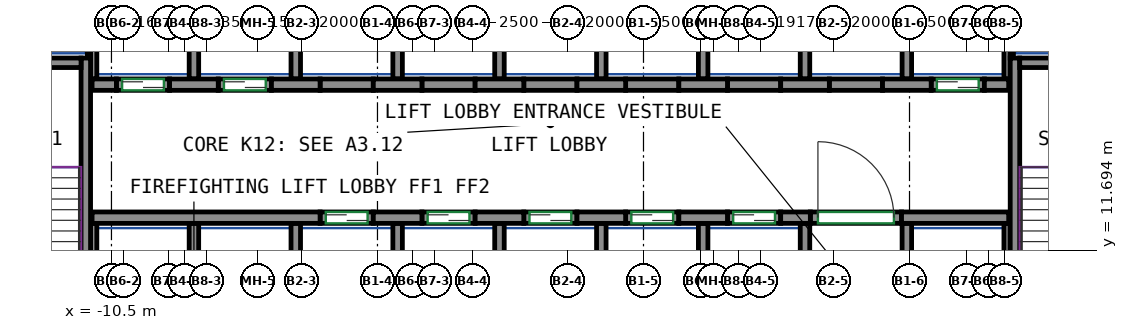
"""IFC4 building model, lengths in metres.
Left out: names, types, materials, properties, quantities, classifications, styles, units other than length and angle.
Written with IfcOpenShell. Run it as: python <this file> out.ifc"""

import sys

from ifc_helpers import new_model, si_unit, direction, frame, frame_2d, origin, place, context, subcontext, project, spatial, rectangle, extrude, source, transform, mapped, element, fill, save


model = new_model("IFC4")
c1 = context("Model", 3, precision=1e-05, world=origin(), true_north=direction((0.0, 1.0)))
c2 = subcontext(c1, "Body", "Model", "MODEL_VIEW")
j1 = project(units=[si_unit("LENGTHUNIT", "METRE"), si_unit("PLANEANGLEUNIT", "RADIAN")], contexts=[c1])
p1 = place(None, origin())
s1 = spatial("IfcSite", under=j1, at=p1, CompositionType="ELEMENT")
p2 = place(p1, origin())
s2 = spatial("IfcBuilding", under=s1, at=p2, CompositionType="ELEMENT")
p3 = place(p2, frame((0.0, 0.0, 51.0)))
s3 = spatial("IfcBuildingStorey", under=s2, at=p3, CompositionType="ELEMENT", Elevation=51.0)
m1 = source(origin(), c2, "Body", "SweptSolid", [
    extrude(rectangle(XDim=7.75, YDim=0.25, at=frame_2d((3.875, 0.0))), origin(), (0.0, 0.0, 1.0), 3.72),
])
p4 = place(p3, frame((-11.175, 9.0, 0.0), z_axis=(0.0, 0.0, 1.0), x_axis=(0.0, 1.0, 0.0)))
e1 = element("IfcWall", 1, at=p4, inside=s3, PredefinedType="SHEAR", context=c2, shape_type="MappedRepresentation", body=[
    mapped(m1, transform((0.0, 0.0, 0.0))),
])
m2 = source(origin(), c2, "Body", "SweptSolid", [
    extrude(rectangle(XDim=3.7, YDim=0.25, at=frame_2d((1.85, 0.0))), origin(), (0.0, 0.0, 1.0), 3.72),
])
p5 = place(p3, frame((-15.0, 16.625, 0.0), z_axis=(0.0, 0.0, 1.0), x_axis=(1.0, 0.0, 0.0)))
e2 = element("IfcWall", 2, at=p5, inside=s3, PredefinedType="SHEAR", context=c2, shape_type="MappedRepresentation", body=[
    mapped(m2, transform((0.0, 0.0, 0.0))),
])
p6 = place(p3, frame((13.275, 9.0, 0.0), z_axis=(0.0, 0.0, 1.0), x_axis=(0.0, 1.0, 0.0)))
e3 = element("IfcWall", 3, at=p6, inside=s3, PredefinedType="SHEAR", context=c2, shape_type="MappedRepresentation", body=[
    mapped(m1, transform((0.0, 0.0, 0.0))),
])
m3 = source(origin(), c2, "Body", "SweptSolid", [
    extrude(rectangle(XDim=3.7, YDim=0.25, at=frame_2d((1.85, 0.0))), origin(), (0.0, 0.0, 1.0), 3.72),
])
p7 = place(p3, frame((13.4, 16.625, 0.0), z_axis=(0.0, 0.0, 1.0), x_axis=(1.0, 0.0, 0.0)))
e4 = element("IfcWall", 4, at=p7, inside=s3, PredefinedType="SHEAR", context=c2, shape_type="MappedRepresentation", body=[
    mapped(m3, transform((0.0, 0.0, 0.0))),
])
m4 = source(origin(), c2, "Body", "SweptSolid", [
    extrude(rectangle(XDim=6.0, YDim=0.3, at=frame_2d((3.0, 0.0))), origin(), (0.0, 0.0, 1.0), 3.72),
])
p8 = place(p3, frame((-11.01, 12.55, 0.0), z_axis=(0.0, 0.0, 1.0), x_axis=(1.0, 0.0, 0.0)))
e5 = element("IfcWall", 5, at=p8, inside=s3, PredefinedType="SHEAR", context=c2, shape_type="MappedRepresentation", body=[
    mapped(m4, transform((0.0, 0.0, 0.0))),
])
m5 = source(origin(), c2, "Body", "SweptSolid", [
    extrude(rectangle(XDim=1.28, YDim=0.3, at=frame_2d((0.64, 0.0))), origin(), (0.0, 0.0, 1.0), 3.72),
])
for number, where, z_axis, x_axis in (
    (6, (-3.61, 12.55, 0.0), (0.0, 0.0, 1.0), (1.0, 0.0, 0.0)),
    (7, (-0.93, 12.55, 0.0), (0.0, 0.0, 1.0), (1.0, 0.0, 0.0)),
    (8, (1.75, 12.55, 0.0), (0.0, 0.0, 1.0), (1.0, 0.0, 0.0)),
    (9, (4.43, 12.55, 0.0), (0.0, 0.0, 1.0), (1.0, 0.0, 0.0)),
):
    element("IfcWall", number, at=place(p3, frame(where, z_axis=z_axis, x_axis=x_axis)), inside=s3, PredefinedType="SHEAR", context=c2, shape_type="MappedRepresentation", body=[
        mapped(m5, transform((0.0, 0.0, 0.0))),
    ])
m6 = source(origin(), c2, "Body", "SweptSolid", [
    extrude(rectangle(XDim=0.78, YDim=0.3, at=frame_2d((0.39, 0.0))), origin(), (0.0, 0.0, 1.0), 3.72),
])
p9 = place(p3, frame((7.11, 12.55, 0.0), z_axis=(0.0, 0.0, 1.0), x_axis=(1.0, 0.0, 0.0)))
e10 = element("IfcWall", 10, at=p9, inside=s3, PredefinedType="SHEAR", context=c2, shape_type="MappedRepresentation", body=[
    mapped(m6, transform((0.0, 0.0, 0.0))),
])
m7 = source(origin(), c2, "Body", "SweptSolid", [
    extrude(rectangle(XDim=2.82, YDim=0.3, at=frame_2d((1.41, 0.0))), origin(), (0.0, 0.0, 1.0), 3.72),
])
p10 = place(p3, frame((10.29, 12.55, 0.0), z_axis=(0.0, 0.0, 1.0), x_axis=(1.0, 0.0, 0.0)))
e11 = element("IfcWall", 11, at=p10, inside=s3, PredefinedType="SHEAR", context=c2, shape_type="MappedRepresentation", body=[
    mapped(m7, transform((0.0, 0.0, 0.0))),
])
m8 = source(origin(), c2, "Body", "SweptSolid", [
    extrude(rectangle(XDim=0.64, YDim=0.3, at=frame_2d((0.32, 0.0))), origin(), (0.0, 0.0, 1.0), 3.72),
])
p11 = place(p3, frame((-11.01, 16.05, 0.0), z_axis=(0.0, 0.0, 1.0), x_axis=(1.0, 0.0, 0.0)))
e12 = element("IfcWall", 12, at=p11, inside=s3, PredefinedType="SHEAR", context=c2, shape_type="MappedRepresentation", body=[
    mapped(m8, transform((0.0, 0.0, 0.0))),
])
for number, where, z_axis, x_axis in (
    (13, (-8.97, 16.05, 0.0), (0.0, 0.0, 1.0), (1.0, 0.0, 0.0)),
    (14, (-6.29, 16.05, 0.0), (0.0, 0.0, 1.0), (1.0, 0.0, 0.0)),
    (15, (-3.61, 16.05, 0.0), (0.0, 0.0, 1.0), (1.0, 0.0, 0.0)),
    (16, (-0.93, 16.05, 0.0), (0.0, 0.0, 1.0), (1.0, 0.0, 0.0)),
    (17, (1.75, 16.05, 0.0), (0.0, 0.0, 1.0), (1.0, 0.0, 0.0)),
    (18, (4.43, 16.05, 0.0), (0.0, 0.0, 1.0), (1.0, 0.0, 0.0)),
):
    element("IfcWall", number, at=place(p3, frame(where, z_axis=z_axis, x_axis=x_axis)), inside=s3, PredefinedType="SHEAR", context=c2, shape_type="MappedRepresentation", body=[
        mapped(m5, transform((0.0, 0.0, 0.0))),
    ])
m9 = source(origin(), c2, "Body", "SweptSolid", [
    extrude(rectangle(XDim=1.28, YDim=0.3, at=frame_2d((0.64, 0.0))), origin(), (0.0, 0.0, 1.0), 3.72),
])
p12 = place(p3, frame((7.11, 16.05, 0.0), z_axis=(0.0, 0.0, 1.0), x_axis=(1.0, 0.0, 0.0)))
e19 = element("IfcWall", 19, at=p12, inside=s3, PredefinedType="SHEAR", context=c2, shape_type="MappedRepresentation", body=[
    mapped(m9, transform((0.0, 0.0, 0.0))),
])
p13 = place(p3, frame((9.79, 16.05, 0.0), z_axis=(0.0, 0.0, 1.0), x_axis=(1.0, 0.0, 0.0)))
e20 = element("IfcWall", 20, at=p13, inside=s3, PredefinedType="SHEAR", context=c2, shape_type="MappedRepresentation", body=[
    mapped(m5, transform((0.0, 0.0, 0.0))),
])
m10 = source(origin(), c2, "Body", "SweptSolid", [
    extrude(rectangle(XDim=0.64, YDim=0.3, at=frame_2d((0.32, 0.0))), origin(), (0.0, 0.0, 1.0), 3.72),
])
p14 = place(p3, frame((12.47, 16.05, 0.0), z_axis=(0.0, 0.0, 1.0), x_axis=(1.0, 0.0, 0.0)))
e21 = element("IfcWall", 21, at=p14, inside=s3, PredefinedType="SHEAR", context=c2, shape_type="MappedRepresentation", body=[
    mapped(m10, transform((0.0, 0.0, 0.0))),
])
m11 = source(origin(), c2, "Body", "SweptSolid", [
    extrude(rectangle(XDim=1.4, YDim=0.3, at=frame_2d((0.7, 0.0))), origin(), (0.0, 0.0, 1.0), 3.72),
])
p15 = place(p3, frame((-5.01, 12.55, 0.0), z_axis=(0.0, 0.0, 1.0), x_axis=(1.0, 0.0, 0.0)))
e22 = element("IfcWall", 22, at=p15, inside=s3, PredefinedType="PARTITIONING", context=c2, shape_type="MappedRepresentation", body=[
    mapped(m11, transform((0.0, 0.0, 0.0))),
])
p16 = place(p15, frame((0.15, 0.0, 0.0)))
e23 = element("IfcOpeningElement", 23, at=p16, cuts=e22, PredefinedType="OPENING", context=c2, shape_type="SweptSolid", body=[
    extrude(rectangle(XDim=1.1, YDim=2.1, at=frame_2d((0.55, 1.05))), frame((0.0, 0.16, 0.0), z_axis=(0.0, -1.0, 0.0), x_axis=(1.0, 0.0, 0.0)), (0.0, 0.0, 1.0), 0.32),
])
m12 = source(origin(), c2, "Body", "SweptSolid", [
    extrude(rectangle(XDim=1.4, YDim=0.3, at=frame_2d((0.7, 0.0))), origin(), (0.0, 0.0, 1.0), 3.72),
])
p17 = place(p3, frame((-2.33, 12.55, 0.0), z_axis=(0.0, 0.0, 1.0), x_axis=(1.0, 0.0, 0.0)))
e24 = element("IfcWall", 24, at=p17, inside=s3, PredefinedType="PARTITIONING", context=c2, shape_type="MappedRepresentation", body=[
    mapped(m12, transform((0.0, 0.0, 0.0))),
])
p18 = place(p17, frame((0.15, 0.0, 0.0)))
e25 = element("IfcOpeningElement", 25, at=p18, cuts=e24, PredefinedType="OPENING", context=c2, shape_type="SweptSolid", body=[
    extrude(rectangle(XDim=1.1, YDim=2.1, at=frame_2d((0.55, 1.05))), frame((0.0, 0.16, 0.0), z_axis=(0.0, -1.0, 0.0), x_axis=(1.0, 0.0, 0.0)), (0.0, 0.0, 1.0), 0.32),
])
p19 = place(p3, frame((0.35, 12.55, 0.0), z_axis=(0.0, 0.0, 1.0), x_axis=(1.0, 0.0, 0.0)))
e26 = element("IfcWall", 26, at=p19, inside=s3, PredefinedType="PARTITIONING", context=c2, shape_type="MappedRepresentation", body=[
    mapped(m11, transform((0.0, 0.0, 0.0))),
])
p20 = place(p19, frame((0.15, 0.0, 0.0)))
e27 = element("IfcOpeningElement", 27, at=p20, cuts=e26, PredefinedType="OPENING", context=c2, shape_type="SweptSolid", body=[
    extrude(rectangle(XDim=1.1, YDim=2.1, at=frame_2d((0.55, 1.05))), frame((0.0, 0.16, 0.0), z_axis=(0.0, -1.0, 0.0), x_axis=(1.0, 0.0, 0.0)), (0.0, 0.0, 1.0), 0.32),
])
p21 = place(p3, frame((3.03, 12.55, 0.0), z_axis=(0.0, 0.0, 1.0), x_axis=(1.0, 0.0, 0.0)))
e28 = element("IfcWall", 28, at=p21, inside=s3, PredefinedType="PARTITIONING", context=c2, shape_type="MappedRepresentation", body=[
    mapped(m11, transform((0.0, 0.0, 0.0))),
])
p22 = place(p21, frame((0.15, 0.0, 0.0)))
e29 = element("IfcOpeningElement", 29, at=p22, cuts=e28, PredefinedType="OPENING", context=c2, shape_type="SweptSolid", body=[
    extrude(rectangle(XDim=1.1, YDim=2.1, at=frame_2d((0.55, 1.05))), frame((0.0, 0.16, 0.0), z_axis=(0.0, -1.0, 0.0), x_axis=(1.0, 0.0, 0.0)), (0.0, 0.0, 1.0), 0.32),
])
p23 = place(p3, frame((5.71, 12.55, 0.0), z_axis=(0.0, 0.0, 1.0), x_axis=(1.0, 0.0, 0.0)))
e30 = element("IfcWall", 30, at=p23, inside=s3, PredefinedType="PARTITIONING", context=c2, shape_type="MappedRepresentation", body=[
    mapped(m12, transform((0.0, 0.0, 0.0))),
])
p24 = place(p23, frame((0.15, 0.0, 0.0)))
e31 = element("IfcOpeningElement", 31, at=p24, cuts=e30, PredefinedType="OPENING", context=c2, shape_type="SweptSolid", body=[
    extrude(rectangle(XDim=1.1, YDim=2.1, at=frame_2d((0.55, 1.05))), frame((0.0, 0.16, 0.0), z_axis=(0.0, -1.0, 0.0), x_axis=(1.0, 0.0, 0.0)), (0.0, 0.0, 1.0), 0.32),
])
p25 = place(p3, frame((11.07, 16.05, 0.0), z_axis=(0.0, 0.0, 1.0), x_axis=(1.0, 0.0, 0.0)))
e32 = element("IfcWall", 32, at=p25, inside=s3, PredefinedType="PARTITIONING", context=c2, shape_type="MappedRepresentation", body=[
    mapped(m11, transform((0.0, 0.0, 0.0))),
])
p26 = place(p25, frame((0.15, 0.0, 0.0)))
e33 = element("IfcOpeningElement", 33, at=p26, cuts=e32, PredefinedType="OPENING", context=c2, shape_type="SweptSolid", body=[
    extrude(rectangle(XDim=1.1, YDim=2.1, at=frame_2d((0.55, 1.05))), frame((0.0, 0.16, 0.0), z_axis=(0.0, -1.0, 0.0), x_axis=(1.0, 0.0, 0.0)), (0.0, 0.0, 1.0), 0.32),
])
p27 = place(p3, frame((-10.37, 16.05, 0.0), z_axis=(0.0, 0.0, 1.0), x_axis=(1.0, 0.0, 0.0)))
e34 = element("IfcWall", 34, at=p27, inside=s3, PredefinedType="PARTITIONING", context=c2, shape_type="MappedRepresentation", body=[
    mapped(m12, transform((0.0, 0.0, 0.0))),
])
p28 = place(p27, frame((0.15, 0.0, 0.0)))
e35 = element("IfcOpeningElement", 35, at=p28, cuts=e34, PredefinedType="OPENING", context=c2, shape_type="SweptSolid", body=[
    extrude(rectangle(XDim=1.1, YDim=2.1, at=frame_2d((0.55, 1.05))), frame((0.0, 0.16, 0.0), z_axis=(0.0, -1.0, 0.0), x_axis=(1.0, 0.0, 0.0)), (0.0, 0.0, 1.0), 0.32),
])
p29 = place(p3, frame((-7.69, 16.05, 0.0), z_axis=(0.0, 0.0, 1.0), x_axis=(1.0, 0.0, 0.0)))
e36 = element("IfcWall", 36, at=p29, inside=s3, PredefinedType="PARTITIONING", context=c2, shape_type="MappedRepresentation", body=[
    mapped(m11, transform((0.0, 0.0, 0.0))),
])
p30 = place(p29, frame((0.15, 0.0, 0.0)))
e37 = element("IfcOpeningElement", 37, at=p30, cuts=e36, PredefinedType="OPENING", context=c2, shape_type="SweptSolid", body=[
    extrude(rectangle(XDim=1.1, YDim=2.1, at=frame_2d((0.55, 1.05))), frame((0.0, 0.16, 0.0), z_axis=(0.0, -1.0, 0.0), x_axis=(1.0, 0.0, 0.0)), (0.0, 0.0, 1.0), 0.32),
])
m13 = source(origin(), c2, "Body", "SweptSolid", [
    extrude(rectangle(XDim=2.4, YDim=0.3, at=frame_2d((1.2, 0.0))), origin(), (0.0, 0.0, 1.0), 3.72),
])
p31 = place(p3, frame((7.89, 12.55, 0.0), z_axis=(0.0, 0.0, 1.0), x_axis=(1.0, 0.0, 0.0)))
e38 = element("IfcWall", 38, at=p31, inside=s3, PredefinedType="PARTITIONING", context=c2, shape_type="MappedRepresentation", body=[
    mapped(m13, transform((0.0, 0.0, 0.0))),
])
p32 = place(p31, frame((0.2, 0.0, 0.0)))
e39 = element("IfcOpeningElement", 39, at=p32, cuts=e38, PredefinedType="OPENING", context=c2, shape_type="SweptSolid", body=[
    extrude(rectangle(XDim=2.0, YDim=2.1, at=frame_2d((1.0, 1.05))), frame((0.0, 0.16, 0.0), z_axis=(0.0, -1.0, 0.0), x_axis=(1.0, 0.0, 0.0)), (0.0, 0.0, 1.0), 0.32),
])
p33 = place(p3, frame((-5.01, 16.05, 0.0), z_axis=(0.0, 0.0, 1.0), x_axis=(1.0, 0.0, 0.0)))
e40 = element("IfcWall", 40, at=p33, inside=s3, PredefinedType="PARTITIONING", context=c2, shape_type="MappedRepresentation", body=[
    mapped(m11, transform((0.0, 0.0, 0.0))),
])
p34 = place(p3, frame((-2.33, 16.05, 0.0), z_axis=(0.0, 0.0, 1.0), x_axis=(1.0, 0.0, 0.0)))
e41 = element("IfcWall", 41, at=p34, inside=s3, PredefinedType="PARTITIONING", context=c2, shape_type="MappedRepresentation", body=[
    mapped(m12, transform((0.0, 0.0, 0.0))),
])
for number, where, z_axis, x_axis in (
    (42, (0.35, 16.05, 0.0), (0.0, 0.0, 1.0), (1.0, 0.0, 0.0)),
    (43, (3.03, 16.05, 0.0), (0.0, 0.0, 1.0), (1.0, 0.0, 0.0)),
):
    element("IfcWall", number, at=place(p3, frame(where, z_axis=z_axis, x_axis=x_axis)), inside=s3, PredefinedType="PARTITIONING", context=c2, shape_type="MappedRepresentation", body=[
        mapped(m11, transform((0.0, 0.0, 0.0))),
    ])
for number, where, z_axis, x_axis in (
    (44, (5.71, 16.05, 0.0), (0.0, 0.0, 1.0), (1.0, 0.0, 0.0)),
    (45, (8.39, 16.05, 0.0), (0.0, 0.0, 1.0), (1.0, 0.0, 0.0)),
):
    element("IfcWall", number, at=place(p3, frame(where, z_axis=z_axis, x_axis=x_axis)), inside=s3, PredefinedType="PARTITIONING", context=c2, shape_type="MappedRepresentation", body=[
        mapped(m12, transform((0.0, 0.0, 0.0))),
    ])
m14 = source(origin(), c2, "Body", "SweptSolid", [
    extrude(rectangle(XDim=3.275, YDim=0.165, at=frame_2d((1.638, 0.0))), origin(), (0.0, 0.0, 1.0), 3.72),
])
for number, where, z_axis, x_axis in (
    (46, (13.067, 16.2, 0.0), (0.0, 0.0, 1.0), (0.0, 1.0, 0.0)),
    (47, (-10.968, 16.2, 0.0), (0.0, 0.0, 1.0), (0.0, 1.0, 0.0)),
):
    element("IfcWall", number, at=place(p3, frame(where, z_axis=z_axis, x_axis=x_axis)), inside=s3, PredefinedType="PARTITIONING", context=c2, shape_type="MappedRepresentation", body=[
        mapped(m14, transform((0.0, 0.0, 0.0))),
    ])
m15 = source(origin(), c2, "Body", "SweptSolid", [
    extrude(rectangle(XDim=3.275, YDim=0.25, at=frame_2d((1.638, 0.0))), origin(), (0.0, 0.0, 1.0), 3.72),
])
p35 = place(p3, frame((10.43, 16.2, 0.0), z_axis=(0.0, 0.0, 1.0), x_axis=(0.0, 1.0, 0.0)))
e48 = element("IfcWall", 48, at=p35, inside=s3, PredefinedType="PARTITIONING", context=c2, shape_type="MappedRepresentation", body=[
    mapped(m15, transform((0.0, 0.0, 0.0))),
])
m16 = source(origin(), c2, "Body", "SweptSolid", [
    extrude(rectangle(XDim=2.725, YDim=0.085, at=frame_2d((1.363, 0.0))), origin(), (0.0, 0.0, 1.0), 3.72),
])
p36 = place(p3, frame((13.192, 16.75, 0.0), z_axis=(0.0, 0.0, 1.0), x_axis=(0.0, 1.0, 0.0)))
e49 = element("IfcWall", 49, at=p36, inside=s3, PredefinedType="PARTITIONING", context=c2, shape_type="MappedRepresentation", body=[
    mapped(m16, transform((0.0, 0.0, 0.0))),
])
for number, where, z_axis, x_axis in (
    (50, (2.39, 16.2, 0.0), (0.0, 0.0, 1.0), (0.0, 1.0, 0.0)),
    (51, (5.07, 16.2, 0.0), (0.0, 0.0, 1.0), (0.0, 1.0, 0.0)),
    (52, (7.75, 16.2, 0.0), (0.0, 0.0, 1.0), (0.0, 1.0, 0.0)),
    (53, (-0.29, 16.2, 0.0), (0.0, 0.0, 1.0), (0.0, 1.0, 0.0)),
):
    element("IfcWall", number, at=place(p3, frame(where, z_axis=z_axis, x_axis=x_axis)), inside=s3, PredefinedType="PARTITIONING", context=c2, shape_type="MappedRepresentation", body=[
        mapped(m15, transform((0.0, 0.0, 0.0))),
    ])
p37 = place(p3, frame((-11.093, 16.75, 0.0), z_axis=(0.0, 0.0, 1.0), x_axis=(0.0, 1.0, 0.0)))
e54 = element("IfcWall", 54, at=p37, inside=s3, PredefinedType="PARTITIONING", context=c2, shape_type="MappedRepresentation", body=[
    mapped(m16, transform((0.0, 0.0, 0.0))),
])
for number, where, z_axis, x_axis in (
    (55, (-2.97, 16.2, 0.0), (0.0, 0.0, 1.0), (0.0, 1.0, 0.0)),
    (56, (-5.65, 16.2, 0.0), (0.0, 0.0, 1.0), (0.0, 1.0, 0.0)),
    (57, (-8.33, 16.2, 0.0), (0.0, 0.0, 1.0), (0.0, 1.0, 0.0)),
):
    element("IfcWall", number, at=place(p3, frame(where, z_axis=z_axis, x_axis=x_axis)), inside=s3, PredefinedType="PARTITIONING", context=c2, shape_type="MappedRepresentation", body=[
        mapped(m15, transform((0.0, 0.0, 0.0))),
    ])
m17 = source(origin(), c2, "Body", "SweptSolid", [
    extrude(rectangle(XDim=3.4, YDim=0.25, at=frame_2d((1.7, 0.0))), origin(), (0.0, 0.0, 1.0), 3.72),
])
p38 = place(p3, frame((10.43, 9.0, 0.0), z_axis=(0.0, 0.0, 1.0), x_axis=(0.0, 1.0, 0.0)))
e58 = element("IfcWall", 58, at=p38, inside=s3, PredefinedType="PARTITIONING", context=c2, shape_type="MappedRepresentation", body=[
    mapped(m17, transform((0.0, 0.0, 0.0))),
])
m18 = source(origin(), c2, "Body", "SweptSolid", [
    extrude(rectangle(XDim=3.4, YDim=0.165, at=frame_2d((1.7, 0.0))), origin(), (0.0, 0.0, 1.0), 3.72),
])
p39 = place(p3, frame((13.067, 9.0, 0.0), z_axis=(0.0, 0.0, 1.0), x_axis=(0.0, 1.0, 0.0)))
e59 = element("IfcWall", 59, at=p39, inside=s3, PredefinedType="PARTITIONING", context=c2, shape_type="MappedRepresentation", body=[
    mapped(m18, transform((0.0, 0.0, 0.0))),
])
for number, where, z_axis, x_axis in (
    (60, (2.39, 9.0, 0.0), (0.0, 0.0, 1.0), (0.0, 1.0, 0.0)),
    (61, (5.07, 9.0, 0.0), (0.0, 0.0, 1.0), (0.0, 1.0, 0.0)),
    (62, (7.75, 9.0, 0.0), (0.0, 0.0, 1.0), (0.0, 1.0, 0.0)),
    (63, (-0.29, 9.0, 0.0), (0.0, 0.0, 1.0), (0.0, 1.0, 0.0)),
):
    element("IfcWall", number, at=place(p3, frame(where, z_axis=z_axis, x_axis=x_axis)), inside=s3, PredefinedType="PARTITIONING", context=c2, shape_type="MappedRepresentation", body=[
        mapped(m17, transform((0.0, 0.0, 0.0))),
    ])
p40 = place(p3, frame((-10.968, 9.0, 0.0), z_axis=(0.0, 0.0, 1.0), x_axis=(0.0, 1.0, 0.0)))
e64 = element("IfcWall", 64, at=p40, inside=s3, PredefinedType="PARTITIONING", context=c2, shape_type="MappedRepresentation", body=[
    mapped(m18, transform((0.0, 0.0, 0.0))),
])
for number, where, z_axis, x_axis in (
    (65, (-2.97, 9.0, 0.0), (0.0, 0.0, 1.0), (0.0, 1.0, 0.0)),
    (66, (-5.65, 9.0, 0.0), (0.0, 0.0, 1.0), (0.0, 1.0, 0.0)),
    (67, (-8.33, 9.0, 0.0), (0.0, 0.0, 1.0), (0.0, 1.0, 0.0)),
):
    element("IfcWall", number, at=place(p3, frame(where, z_axis=z_axis, x_axis=x_axis)), inside=s3, PredefinedType="PARTITIONING", context=c2, shape_type="MappedRepresentation", body=[
        mapped(m17, transform((0.0, 0.0, 0.0))),
    ])
p41 = place(p32, origin())
e68 = element("IfcDoor", 68, at=p41, inside=s3, OperationType="DOUBLE_DOOR_SINGLE_SWING", PredefinedType="DOOR", context=c2, shape_type="SweptSolid", body=[
    extrude(rectangle(XDim=2.0, YDim=2.1, at=frame_2d((1.0, 1.05))), frame((0.0, 0.025, 0.0), z_axis=(0.0, -1.0, 0.0), x_axis=(1.0, 0.0, 0.0)), (0.0, 0.0, 1.0), 0.05),
])
fill(e39, e68)
p42 = place(p16, origin())
e69 = element("IfcDoor", 69, at=p42, inside=s3, OperationType="DOUBLE_DOOR_SLIDING", PredefinedType="DOOR", context=c2, shape_type="SweptSolid", body=[
    extrude(rectangle(XDim=1.1, YDim=2.1, at=frame_2d((0.55, 1.05))), frame((0.0, 0.025, 0.0), z_axis=(0.0, -1.0, 0.0), x_axis=(1.0, 0.0, 0.0)), (0.0, 0.0, 1.0), 0.05),
])
fill(e23, e69)
p43 = place(p18, origin())
e70 = element("IfcDoor", 70, at=p43, inside=s3, OperationType="DOUBLE_DOOR_SLIDING", PredefinedType="DOOR", context=c2, shape_type="SweptSolid", body=[
    extrude(rectangle(XDim=1.1, YDim=2.1, at=frame_2d((0.55, 1.05))), frame((0.0, 0.025, 0.0), z_axis=(0.0, -1.0, 0.0), x_axis=(1.0, 0.0, 0.0)), (0.0, 0.0, 1.0), 0.05),
])
fill(e25, e70)
p44 = place(p20, origin())
e71 = element("IfcDoor", 71, at=p44, inside=s3, OperationType="DOUBLE_DOOR_SLIDING", PredefinedType="DOOR", context=c2, shape_type="SweptSolid", body=[
    extrude(rectangle(XDim=1.1, YDim=2.1, at=frame_2d((0.55, 1.05))), frame((0.0, 0.025, 0.0), z_axis=(0.0, -1.0, 0.0), x_axis=(1.0, 0.0, 0.0)), (0.0, 0.0, 1.0), 0.05),
])
fill(e27, e71)
p45 = place(p22, origin())
e72 = element("IfcDoor", 72, at=p45, inside=s3, OperationType="DOUBLE_DOOR_SLIDING", PredefinedType="DOOR", context=c2, shape_type="SweptSolid", body=[
    extrude(rectangle(XDim=1.1, YDim=2.1, at=frame_2d((0.55, 1.05))), frame((0.0, 0.025, 0.0), z_axis=(0.0, -1.0, 0.0), x_axis=(1.0, 0.0, 0.0)), (0.0, 0.0, 1.0), 0.05),
])
fill(e29, e72)
p46 = place(p24, origin())
e73 = element("IfcDoor", 73, at=p46, inside=s3, OperationType="DOUBLE_DOOR_SLIDING", PredefinedType="DOOR", context=c2, shape_type="SweptSolid", body=[
    extrude(rectangle(XDim=1.1, YDim=2.1, at=frame_2d((0.55, 1.05))), frame((0.0, 0.025, 0.0), z_axis=(0.0, -1.0, 0.0), x_axis=(1.0, 0.0, 0.0)), (0.0, 0.0, 1.0), 0.05),
])
fill(e31, e73)
p47 = place(p26, origin())
e74 = element("IfcDoor", 74, at=p47, inside=s3, OperationType="DOUBLE_DOOR_SLIDING", PredefinedType="DOOR", context=c2, shape_type="SweptSolid", body=[
    extrude(rectangle(XDim=1.1, YDim=2.1, at=frame_2d((0.55, 1.05))), frame((0.0, 0.025, 0.0), z_axis=(0.0, -1.0, 0.0), x_axis=(1.0, 0.0, 0.0)), (0.0, 0.0, 1.0), 0.05),
])
fill(e33, e74)
p48 = place(p28, origin())
e75 = element("IfcDoor", 75, at=p48, inside=s3, OperationType="DOUBLE_DOOR_SLIDING", PredefinedType="DOOR", context=c2, shape_type="SweptSolid", body=[
    extrude(rectangle(XDim=1.1, YDim=2.1, at=frame_2d((0.55, 1.05))), frame((0.0, 0.025, 0.0), z_axis=(0.0, -1.0, 0.0), x_axis=(1.0, 0.0, 0.0)), (0.0, 0.0, 1.0), 0.05),
])
fill(e35, e75)
p49 = place(p30, origin())
e76 = element("IfcDoor", 76, at=p49, inside=s3, OperationType="DOUBLE_DOOR_SLIDING", PredefinedType="DOOR", context=c2, shape_type="SweptSolid", body=[
    extrude(rectangle(XDim=1.1, YDim=2.1, at=frame_2d((0.55, 1.05))), frame((0.0, 0.025, 0.0), z_axis=(0.0, -1.0, 0.0), x_axis=(1.0, 0.0, 0.0)), (0.0, 0.0, 1.0), 0.05),
])
fill(e37, e76)
save(model, sys.argv[1])
